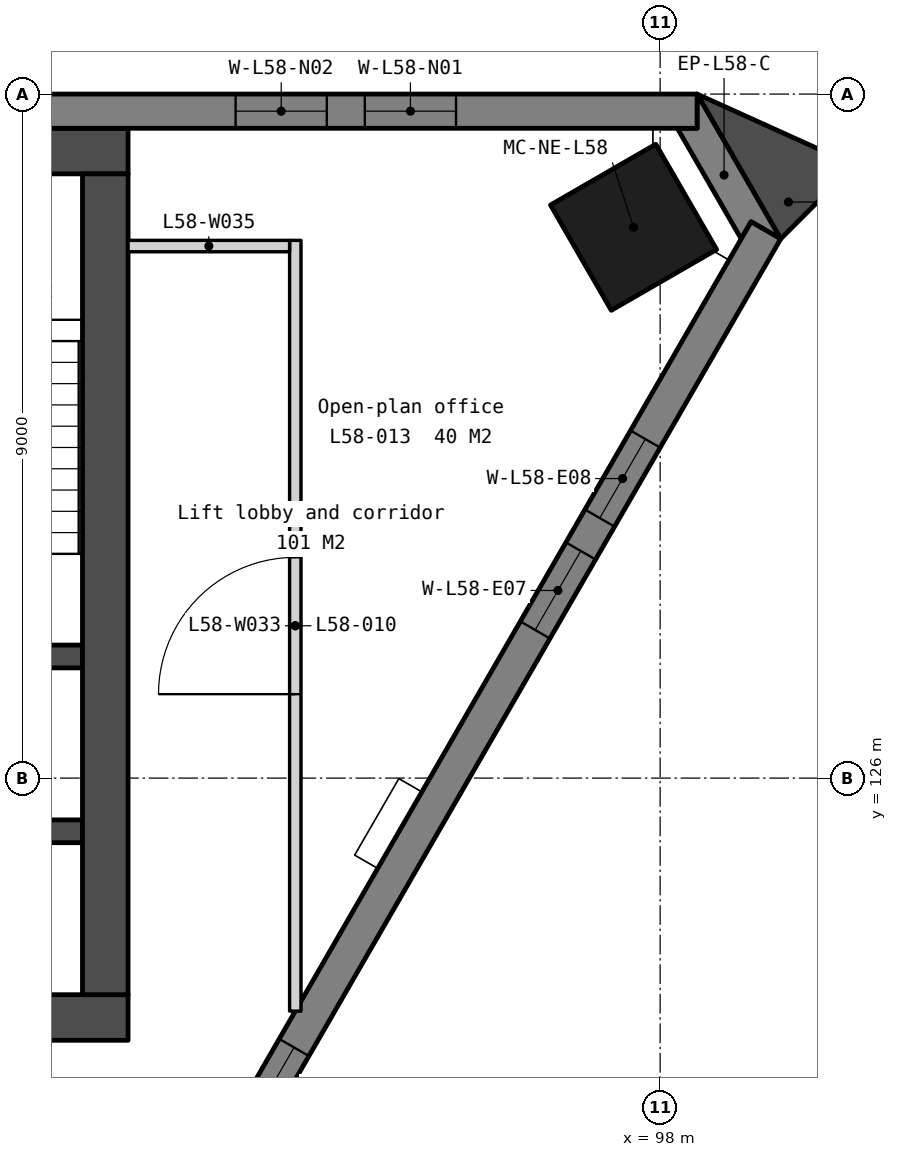
"""IFC4 building model, lengths in metres.
Left out: names, types, materials, properties, quantities, classifications, styles, units other than length and angle.
Written with IfcOpenShell. Run it as: python <this file> out.ifc"""

import sys

from ifc_helpers import new_model, si_unit, direction, frame, frame_2d, origin, origin_2d, place, context, subcontext, project, spatial, polyline, rectangle, outline, extrude, element, fill, save


model = new_model("IFC4")
c1 = context("Model", 3, precision=1e-05, world=origin(), true_north=direction((0.0, 1.0)))
c2 = subcontext(c1, "Body", "Model", "MODEL_VIEW")
j1 = project(units=[si_unit("LENGTHUNIT", "METRE"), si_unit("PLANEANGLEUNIT", "RADIAN")], contexts=[c1])
p1 = place(None, origin())
s1 = spatial("IfcSite", under=j1, at=p1, CompositionType="ELEMENT")
p2 = place(p1, origin())
s2 = spatial("IfcBuilding", under=s1, at=p2, CompositionType="ELEMENT")
p3 = place(p2, frame((0.0, 0.0, 238.7)))
s3 = spatial("IfcBuildingStorey", under=s2, at=p3, CompositionType="ELEMENT", Elevation=238.7)
p4 = place(p3, frame((97.651, 133.247, 0.0), z_axis=(0.0, 0.0, 1.0), x_axis=(-0.5, 0.866025403784, 0.0)))
e1 = element("IfcColumn", 1, at=p4, inside=s3, PredefinedType="COLUMN", context=c2, shape_type="SweptSolid", body=[
    extrude(rectangle(XDim=1.6, YDim=1.6, at=origin_2d()), origin(), (0.0, 0.0, 1.0), 3.9),
])
p5 = place(p3, frame((69.0, 134.25, 0.0), z_axis=(0.0, 0.0, 1.0), x_axis=(1.0, 0.0, 0.0)))
e2 = element("IfcWall", 2, at=p5, inside=s3, PredefinedType="SOLIDWALL", context=c2, shape_type="SweptSolid", body=[
    extrude(rectangle(XDim=22.0, YDim=0.6, at=frame_2d((11.0, 0.0))), origin(), (0.0, 0.0, 1.0), 3.75),
])
p6 = place(p3, frame((69.0, 122.85, 0.0), z_axis=(0.0, 0.0, 1.0), x_axis=(1.0, 0.0, 0.0)))
e3 = element("IfcWall", 3, at=p6, inside=s3, PredefinedType="SOLIDWALL", context=c2, shape_type="SweptSolid", body=[
    extrude(rectangle(XDim=22.0, YDim=0.6, at=frame_2d((11.0, 0.0))), origin(), (0.0, 0.0, 1.0), 3.75),
])
p7 = place(p6, frame((16.375, 0.0, 0.0)))
e4 = element("IfcOpeningElement", 4, at=p7, cuts=e3, PredefinedType="OPENING", context=c2, shape_type="SweptSolid", body=[
    extrude(rectangle(XDim=1.8, YDim=2.1, at=frame_2d((0.9, 1.05))), frame((0.0, 0.31, 0.0), z_axis=(0.0, -1.0, 0.0), x_axis=(1.0, 0.0, 0.0)), (0.0, 0.0, 1.0), 0.62),
])
p8 = place(p6, frame((3.825, 0.0, 0.0)))
e5 = element("IfcOpeningElement", 5, at=p8, cuts=e3, PredefinedType="OPENING", context=c2, shape_type="SweptSolid", body=[
    extrude(rectangle(XDim=1.8, YDim=2.1, at=frame_2d((0.9, 1.05))), frame((0.0, 0.31, 0.0), z_axis=(0.0, -1.0, 0.0), x_axis=(1.0, 0.0, 0.0)), (0.0, 0.0, 1.0), 0.62),
])
p9 = place(p6, frame((12.85, 0.0, 0.0)))
e6 = element("IfcOpeningElement", 6, at=p9, cuts=e3, PredefinedType="OPENING", context=c2, shape_type="SweptSolid", body=[
    extrude(rectangle(XDim=1.5, YDim=2.1, at=frame_2d((0.75, 1.05))), frame((0.0, 0.31, 0.0), z_axis=(0.0, -1.0, 0.0), x_axis=(1.0, 0.0, 0.0)), (0.0, 0.0, 1.0), 0.62),
])
for number, where, z_axis, x_axis in (
    (7, (87.85, 127.6, 0.0), (0.0, 0.0, 1.0), (1.0, 0.0, 0.0)),
    (8, (87.85, 125.3, 0.0), (0.0, 0.0, 1.0), (1.0, 0.0, 0.0)),
):
    element("IfcWall", number, at=place(p3, frame(where, z_axis=z_axis, x_axis=x_axis)), inside=s3, PredefinedType="SOLIDWALL", context=c2, shape_type="SweptSolid", body=[
        extrude(rectangle(XDim=2.55, YDim=0.3, at=frame_2d((1.275, 0.0))), origin(), (0.0, 0.0, 1.0), 3.75),
    ])
p10 = place(p3, frame((90.7, 133.95, 0.0), z_axis=(0.0, 0.0, 1.0), x_axis=(0.0, -1.0, 0.0)))
e9 = element("IfcWall", 9, at=p10, inside=s3, PredefinedType="SOLIDWALL", context=c2, shape_type="SweptSolid", body=[
    extrude(rectangle(XDim=10.8, YDim=0.6, at=frame_2d((5.4, 0.0))), origin(), (0.0, 0.0, 1.0), 3.75),
])
p11 = place(p3, frame((0.0, 0.0, -0.45)))
e10 = element("IfcWall", 10, at=p11, inside=s3, PredefinedType="SOLIDWALL", context=c2, shape_type="SweptSolid", body=[
    extrude(outline(polyline([(99.586, 133.095), (99.197, 133.32), (99.067, 133.095), (98.226, 134.55), (98.486, 134.55), (98.486, 135.0), (99.586, 133.095)])), origin(), (0.0, 0.0, 1.0), 4.2),
])
p12 = place(p3, frame((98.486, 134.775, -0.45), z_axis=(0.0, 0.0, 1.0), x_axis=(-1.0, 0.0, 0.0)))
e11 = element("IfcWall", 11, at=p12, inside=s3, PredefinedType="SOLIDWALL", context=c2, shape_type="SweptSolid", body=[
    extrude(outline(polyline([(36.972, 0.0), (36.972, 4.2), (0.0, 4.2), (0.0, 0.0), (36.972, 0.0)])), frame((0.0, 0.225, 0.0), z_axis=(0.0, -1.0, 0.0), x_axis=(1.0, 0.0, 0.0)), (0.0, 0.0, 1.0), 0.45),
])
p13 = place(p12, frame((3.172, 0.0, 1.25)))
e12 = element("IfcOpeningElement", 12, at=p13, cuts=e11, PredefinedType="OPENING", context=c2, shape_type="SweptSolid", body=[
    extrude(rectangle(XDim=1.2, YDim=2.2, at=frame_2d((0.6, 1.1))), frame((0.0, 0.235, 0.0), z_axis=(0.0, -1.0, 0.0), x_axis=(1.0, 0.0, 0.0)), (0.0, 0.0, 1.0), 0.47),
])
p14 = place(p12, frame((4.872, 0.0, 1.25)))
e13 = element("IfcOpeningElement", 13, at=p14, cuts=e11, PredefinedType="OPENING", context=c2, shape_type="SweptSolid", body=[
    extrude(rectangle(XDim=1.2, YDim=2.2, at=frame_2d((0.6, 1.1))), frame((0.0, 0.235, 0.0), z_axis=(0.0, -1.0, 0.0), x_axis=(1.0, 0.0, 0.0)), (0.0, 0.0, 1.0), 0.47),
])
p15 = place(p12, frame((12.415, 0.0, 1.25)))
e14 = element("IfcOpeningElement", 14, at=p15, cuts=e11, PredefinedType="OPENING", context=c2, shape_type="SweptSolid", body=[
    extrude(rectangle(XDim=1.2, YDim=2.2, at=frame_2d((0.6, 1.1))), frame((0.0, 0.235, 0.0), z_axis=(0.0, -1.0, 0.0), x_axis=(1.0, 0.0, 0.0)), (0.0, 0.0, 1.0), 0.47),
])
p16 = place(p12, frame((14.115, 0.0, 1.25)))
e15 = element("IfcOpeningElement", 15, at=p16, cuts=e11, PredefinedType="OPENING", context=c2, shape_type="SweptSolid", body=[
    extrude(rectangle(XDim=1.2, YDim=2.2, at=frame_2d((0.6, 1.1))), frame((0.0, 0.235, 0.0), z_axis=(0.0, -1.0, 0.0), x_axis=(1.0, 0.0, 0.0)), (0.0, 0.0, 1.0), 0.47),
])
p17 = place(p12, frame((21.658, 0.0, 1.25)))
e16 = element("IfcOpeningElement", 16, at=p17, cuts=e11, PredefinedType="OPENING", context=c2, shape_type="SweptSolid", body=[
    extrude(rectangle(XDim=1.2, YDim=2.2, at=frame_2d((0.6, 1.1))), frame((0.0, 0.235, 0.0), z_axis=(0.0, -1.0, 0.0), x_axis=(1.0, 0.0, 0.0)), (0.0, 0.0, 1.0), 0.47),
])
p18 = place(p12, frame((23.358, 0.0, 1.25)))
e17 = element("IfcOpeningElement", 17, at=p18, cuts=e11, PredefinedType="OPENING", context=c2, shape_type="SweptSolid", body=[
    extrude(rectangle(XDim=1.2, YDim=2.2, at=frame_2d((0.6, 1.1))), frame((0.0, 0.235, 0.0), z_axis=(0.0, -1.0, 0.0), x_axis=(1.0, 0.0, 0.0)), (0.0, 0.0, 1.0), 0.47),
])
p19 = place(p12, frame((30.901, 0.0, 1.25)))
e18 = element("IfcOpeningElement", 18, at=p19, cuts=e11, PredefinedType="OPENING", context=c2, shape_type="SweptSolid", body=[
    extrude(rectangle(XDim=1.2, YDim=2.2, at=frame_2d((0.6, 1.1))), frame((0.0, 0.235, 0.0), z_axis=(0.0, -1.0, 0.0), x_axis=(1.0, 0.0, 0.0)), (0.0, 0.0, 1.0), 0.47),
])
p20 = place(p12, frame((32.601, 0.0, 1.25)))
e19 = element("IfcOpeningElement", 19, at=p20, cuts=e11, PredefinedType="OPENING", context=c2, shape_type="SweptSolid", body=[
    extrude(rectangle(XDim=1.2, YDim=2.2, at=frame_2d((0.6, 1.1))), frame((0.0, 0.235, 0.0), z_axis=(0.0, -1.0, 0.0), x_axis=(1.0, 0.0, 0.0)), (0.0, 0.0, 1.0), 0.47),
])
p21 = place(p3, frame((80.905, 101.188, -0.45), z_axis=(0.0, 0.0, 1.0), x_axis=(0.500002536638, 0.866023939251, 0.0)))
e20 = element("IfcWall", 20, at=p21, inside=s3, PredefinedType="SOLIDWALL", context=c2, shape_type="SweptSolid", body=[
    extrude(outline(polyline([(36.972, 0.0), (36.972, 4.2), (0.0, 4.2), (0.0, 0.0), (36.972, 0.0)])), frame((0.0, 0.225, 0.0), z_axis=(0.0, -1.0, 0.0), x_axis=(1.0, 0.0, 0.0)), (0.0, 0.0, 1.0), 0.45),
])
p22 = place(p21, frame((3.172, 0.0, 1.25)))
e21 = element("IfcOpeningElement", 21, at=p22, cuts=e20, PredefinedType="OPENING", context=c2, shape_type="SweptSolid", body=[
    extrude(rectangle(XDim=1.2, YDim=2.2, at=frame_2d((0.6, 1.1))), frame((0.0, 0.235, 0.0), z_axis=(0.0, -1.0, 0.0), x_axis=(1.0, 0.0, 0.0)), (0.0, 0.0, 1.0), 0.47),
])
p23 = place(p21, frame((4.872, 0.0, 1.25)))
e22 = element("IfcOpeningElement", 22, at=p23, cuts=e20, PredefinedType="OPENING", context=c2, shape_type="SweptSolid", body=[
    extrude(rectangle(XDim=1.2, YDim=2.2, at=frame_2d((0.6, 1.1))), frame((0.0, 0.235, 0.0), z_axis=(0.0, -1.0, 0.0), x_axis=(1.0, 0.0, 0.0)), (0.0, 0.0, 1.0), 0.47),
])
p24 = place(p21, frame((12.415, 0.0, 1.25)))
e23 = element("IfcOpeningElement", 23, at=p24, cuts=e20, PredefinedType="OPENING", context=c2, shape_type="SweptSolid", body=[
    extrude(rectangle(XDim=1.2, YDim=2.2, at=frame_2d((0.6, 1.1))), frame((0.0, 0.235, 0.0), z_axis=(0.0, -1.0, 0.0), x_axis=(1.0, 0.0, 0.0)), (0.0, 0.0, 1.0), 0.47),
])
p25 = place(p21, frame((14.115, 0.0, 1.25)))
e24 = element("IfcOpeningElement", 24, at=p25, cuts=e20, PredefinedType="OPENING", context=c2, shape_type="SweptSolid", body=[
    extrude(rectangle(XDim=1.2, YDim=2.2, at=frame_2d((0.6, 1.1))), frame((0.0, 0.235, 0.0), z_axis=(0.0, -1.0, 0.0), x_axis=(1.0, 0.0, 0.0)), (0.0, 0.0, 1.0), 0.47),
])
p26 = place(p21, frame((21.658, 0.0, 1.25)))
e25 = element("IfcOpeningElement", 25, at=p26, cuts=e20, PredefinedType="OPENING", context=c2, shape_type="SweptSolid", body=[
    extrude(rectangle(XDim=1.2, YDim=2.2, at=frame_2d((0.6, 1.1))), frame((0.0, 0.235, 0.0), z_axis=(0.0, -1.0, 0.0), x_axis=(1.0, 0.0, 0.0)), (0.0, 0.0, 1.0), 0.47),
])
p27 = place(p21, frame((23.358, 0.0, 1.25)))
e26 = element("IfcOpeningElement", 26, at=p27, cuts=e20, PredefinedType="OPENING", context=c2, shape_type="SweptSolid", body=[
    extrude(rectangle(XDim=1.2, YDim=2.2, at=frame_2d((0.6, 1.1))), frame((0.0, 0.235, 0.0), z_axis=(0.0, -1.0, 0.0), x_axis=(1.0, 0.0, 0.0)), (0.0, 0.0, 1.0), 0.47),
])
p28 = place(p21, frame((30.901, 0.0, 1.25)))
e27 = element("IfcOpeningElement", 27, at=p28, cuts=e20, PredefinedType="OPENING", context=c2, shape_type="SweptSolid", body=[
    extrude(rectangle(XDim=1.2, YDim=2.2, at=frame_2d((0.6, 1.1))), frame((0.0, 0.235, 0.0), z_axis=(0.0, -1.0, 0.0), x_axis=(1.0, 0.0, 0.0)), (0.0, 0.0, 1.0), 0.47),
])
p29 = place(p21, frame((32.601, 0.0, 1.25)))
e28 = element("IfcOpeningElement", 28, at=p29, cuts=e20, PredefinedType="OPENING", context=c2, shape_type="SweptSolid", body=[
    extrude(rectangle(XDim=1.2, YDim=2.2, at=frame_2d((0.6, 1.1))), frame((0.0, 0.235, 0.0), z_axis=(0.0, -1.0, 0.0), x_axis=(1.0, 0.0, 0.0)), (0.0, 0.0, 1.0), 0.47),
])
p30 = place(p3, frame((0.0, 0.0, -0.45)))
e29 = element("IfcWall", 29, at=p30, inside=s3, PredefinedType="SOLIDWALL", context=c2, shape_type="SweptSolid", body=[
    extrude(outline(polyline([(99.586, 133.095), (100.554, 134.064), (98.486, 135.0), (99.586, 133.095)])), origin(), (0.0, 0.0, 1.0), 4.2),
])
p31 = place(p3, frame((93.2, 122.934, 0.0), z_axis=(0.0, 0.0, 1.0), x_axis=(0.0, 1.0, 0.0)))
e30 = element("IfcWall", 30, at=p31, inside=s3, PredefinedType="PARTITIONING", context=c2, shape_type="SweptSolid", body=[
    extrude(rectangle(XDim=10.141, YDim=0.15, at=frame_2d((5.071, 0.0))), origin(), (0.0, 0.0, 1.0), 3.75),
])
p32 = place(p31, frame((4.171, 0.0, 0.0)))
e31 = element("IfcOpeningElement", 31, at=p32, cuts=e30, PredefinedType="OPENING", context=c2, shape_type="SweptSolid", body=[
    extrude(rectangle(XDim=1.8, YDim=2.1, at=frame_2d((0.9, 1.05))), frame((0.0, 0.085, 0.0), z_axis=(0.0, -1.0, 0.0), x_axis=(1.0, 0.0, 0.0)), (0.0, 0.0, 1.0), 0.17),
])
p33 = place(p3, frame((91.0, 133.0, 0.0), z_axis=(0.0, 0.0, 1.0), x_axis=(1.0, 0.0, 0.0)))
e32 = element("IfcWall", 32, at=p33, inside=s3, PredefinedType="PARTITIONING", context=c2, shape_type="SweptSolid", body=[
    extrude(rectangle(XDim=2.125, YDim=0.15, at=frame_2d((1.062, 0.0))), origin(), (0.0, 0.0, 1.0), 3.75),
])
p34 = place(p13, origin())
e33 = element("IfcWindow", 33, at=p34, inside=s3, PartitioningType="SINGLE_PANEL", PredefinedType="WINDOW", context=c2, shape_type="SweptSolid", body=[
    extrude(rectangle(XDim=1.2, YDim=2.2, at=frame_2d((0.6, 1.1))), frame((0.0, 0.03, 0.0), z_axis=(0.0, -1.0, 0.0), x_axis=(1.0, 0.0, 0.0)), (0.0, 0.0, 1.0), 0.06),
])
fill(e12, e33)
p35 = place(p14, origin())
e34 = element("IfcWindow", 34, at=p35, inside=s3, PartitioningType="SINGLE_PANEL", PredefinedType="WINDOW", context=c2, shape_type="SweptSolid", body=[
    extrude(rectangle(XDim=1.2, YDim=2.2, at=frame_2d((0.6, 1.1))), frame((0.0, 0.03, 0.0), z_axis=(0.0, -1.0, 0.0), x_axis=(1.0, 0.0, 0.0)), (0.0, 0.0, 1.0), 0.06),
])
fill(e13, e34)
p36 = place(p27, origin())
e35 = element("IfcWindow", 35, at=p36, inside=s3, PartitioningType="SINGLE_PANEL", PredefinedType="WINDOW", context=c2, shape_type="SweptSolid", body=[
    extrude(rectangle(XDim=1.2, YDim=2.2, at=frame_2d((0.6, 1.1))), frame((0.0, 0.03, 0.0), z_axis=(0.0, -1.0, 0.0), x_axis=(1.0, 0.0, 0.0)), (0.0, 0.0, 1.0), 0.06),
])
fill(e26, e35)
p37 = place(p28, origin())
e36 = element("IfcWindow", 36, at=p37, inside=s3, PartitioningType="SINGLE_PANEL", PredefinedType="WINDOW", context=c2, shape_type="SweptSolid", body=[
    extrude(rectangle(XDim=1.2, YDim=2.2, at=frame_2d((0.6, 1.1))), frame((0.0, 0.03, 0.0), z_axis=(0.0, -1.0, 0.0), x_axis=(1.0, 0.0, 0.0)), (0.0, 0.0, 1.0), 0.06),
])
fill(e27, e36)
p38 = place(p29, origin())
e37 = element("IfcWindow", 37, at=p38, inside=s3, PartitioningType="SINGLE_PANEL", PredefinedType="WINDOW", context=c2, shape_type="SweptSolid", body=[
    extrude(rectangle(XDim=1.2, YDim=2.2, at=frame_2d((0.6, 1.1))), frame((0.0, 0.03, 0.0), z_axis=(0.0, -1.0, 0.0), x_axis=(1.0, 0.0, 0.0)), (0.0, 0.0, 1.0), 0.06),
])
fill(e28, e37)
p39 = place(p32, origin())
e38 = element("IfcDoor", 38, at=p39, inside=s3, OperationType="SINGLE_SWING_LEFT", PredefinedType="DOOR", context=c2, shape_type="SweptSolid", body=[
    extrude(rectangle(XDim=1.8, YDim=2.1, at=frame_2d((0.9, 1.05))), frame((0.0, 0.025, 0.0), z_axis=(0.0, -1.0, 0.0), x_axis=(1.0, 0.0, 0.0)), (0.0, 0.0, 1.0), 0.05),
])
fill(e31, e38)
save(model, sys.argv[1])
